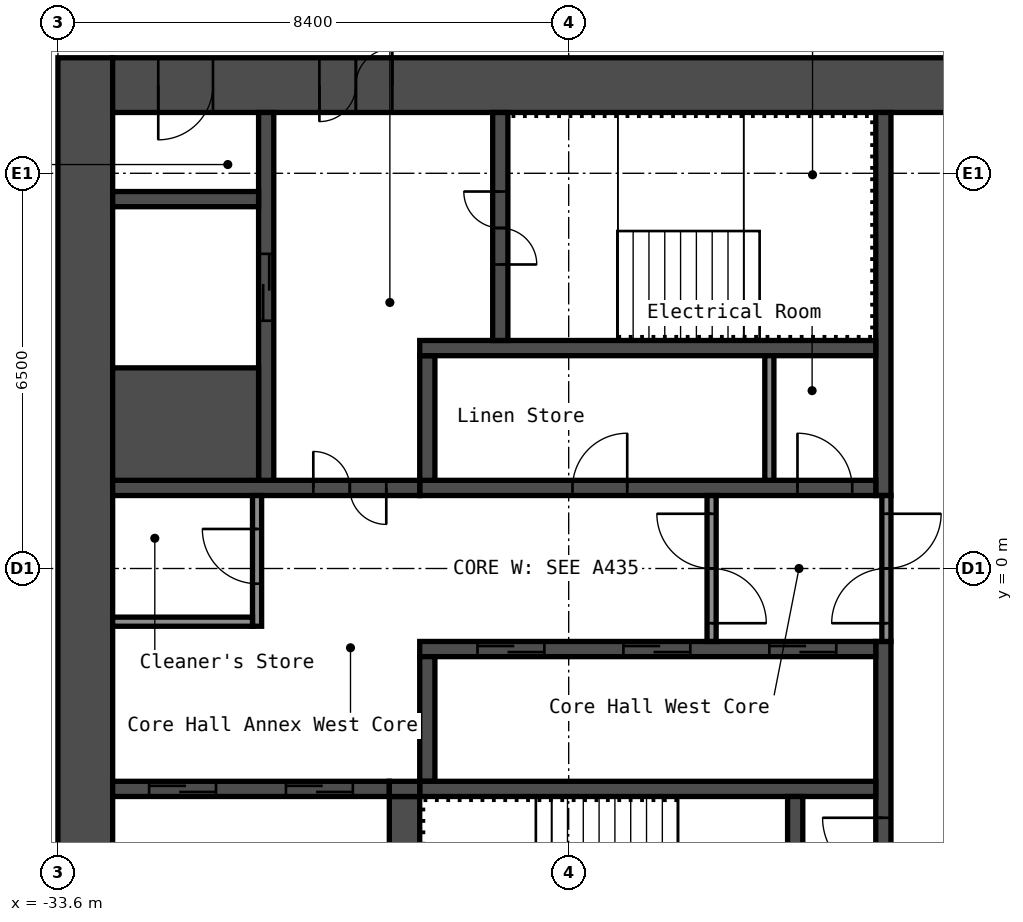
"""IFC4 building model, lengths in metres.
Left out: names, types, materials, properties, quantities, classifications, styles, units other than length and angle.
Written with IfcOpenShell. Run it as: python <this file> out.ifc"""

import sys

from ifc_helpers import new_model, si_unit, direction, frame, frame_2d, origin, place, context, subcontext, project, spatial, rectangle, extrude, element, fill, save


model = new_model("IFC4")
c1 = context("Model", 3, precision=1e-05, world=origin(), true_north=direction((0.0, 1.0)))
c2 = subcontext(c1, "Body", "Model", "MODEL_VIEW")
j1 = project(units=[si_unit("LENGTHUNIT", "METRE"), si_unit("PLANEANGLEUNIT", "RADIAN")], contexts=[c1])
p1 = place(None, origin())
s1 = spatial("IfcSite", under=j1, at=p1, CompositionType="ELEMENT")
p2 = place(p1, origin())
s2 = spatial("IfcBuilding", under=s1, at=p2, CompositionType="ELEMENT")
p3 = place(p2, frame((0.0, 0.0, 245.4)))
s3 = spatial("IfcBuildingStorey", under=s2, at=p3, CompositionType="ELEMENT", Elevation=245.4)
p4 = place(p3, frame((-33.15, -8.4, 0.0), z_axis=(0.0, 0.0, 1.0), x_axis=(0.0, 1.0, 0.0)))
e1 = element("IfcWall", 1, at=p4, inside=s3, PredefinedType="SHEAR", context=c2, shape_type="SweptSolid", body=[
    extrude(rectangle(XDim=16.8, YDim=0.9, at=frame_2d((8.4, 0.0))), origin(), (0.0, 0.0, 1.0), 2.75),
])
p5 = place(p3, frame((-32.7, 7.95, 0.0), z_axis=(0.0, 0.0, 1.0), x_axis=(1.0, 0.0, 0.0)))
e2 = element("IfcWall", 2, at=p5, inside=s3, PredefinedType="SHEAR", context=c2, shape_type="SweptSolid", body=[
    extrude(rectangle(XDim=15.0, YDim=0.9, at=frame_2d((7.5, 0.0))), origin(), (0.0, 0.0, 1.0), 2.75),
])
p6 = place(p5, frame((3.4, 0.0, 0.0)))
e3 = element("IfcOpeningElement", 3, at=p6, cuts=e2, PredefinedType="OPENING", context=c2, shape_type="SweptSolid", body=[
    extrude(rectangle(XDim=1.2, YDim=2.1, at=frame_2d((0.6, 1.05))), frame((0.0, 0.46, 0.0), z_axis=(0.0, -1.0, 0.0), x_axis=(1.0, 0.0, 0.0)), (0.0, 0.0, 1.0), 0.92),
])
p7 = place(p5, frame((0.75, 0.0, 0.0)))
e4 = element("IfcOpeningElement", 4, at=p7, cuts=e2, PredefinedType="OPENING", context=c2, shape_type="SweptSolid", body=[
    extrude(rectangle(XDim=0.9, YDim=2.1, at=frame_2d((0.45, 1.05))), frame((0.0, 0.46, 0.0), z_axis=(0.0, -1.0, 0.0), x_axis=(1.0, 0.0, 0.0)), (0.0, 0.0, 1.0), 0.92),
])
p8 = place(p3, frame((-20.025, 1.2, 0.0), z_axis=(0.0, 0.0, 1.0), x_axis=(0.0, 1.0, 0.0)))
e5 = element("IfcWall", 5, at=p8, inside=s3, PredefinedType="SHEAR", context=c2, shape_type="SweptSolid", body=[
    extrude(rectangle(XDim=6.3, YDim=0.25, at=frame_2d((3.15, 0.0))), origin(), (0.0, 0.0, 1.0), 2.75),
])
p9 = place(p3, frame((-20.025, -7.5, 0.0), z_axis=(0.0, 0.0, 1.0), x_axis=(0.0, 1.0, 0.0)))
e6 = element("IfcWall", 6, at=p9, inside=s3, PredefinedType="SHEAR", context=c2, shape_type="SweptSolid", body=[
    extrude(rectangle(XDim=6.3, YDim=0.25, at=frame_2d((3.15, 0.0))), origin(), (0.0, 0.0, 1.0), 2.75),
])
p10 = place(p9, frame((2.4, 0.0, 0.0)))
e7 = element("IfcOpeningElement", 7, at=p10, cuts=e6, PredefinedType="OPENING", context=c2, shape_type="SweptSolid", body=[
    extrude(rectangle(XDim=1.0, YDim=2.1, at=frame_2d((0.5, 1.05))), frame((0.0, 0.135, 0.0), z_axis=(0.0, -1.0, 0.0), x_axis=(1.0, 0.0, 0.0)), (0.0, 0.0, 1.0), 0.27),
])
p11 = place(p3, frame((-27.65, 1.325, 0.0), z_axis=(0.0, 0.0, 1.0), x_axis=(1.0, 0.0, 0.0)))
e8 = element("IfcWall", 8, at=p11, inside=s3, PredefinedType="SHEAR", context=c2, shape_type="SweptSolid", body=[
    extrude(rectangle(XDim=7.5, YDim=0.25, at=frame_2d((3.75, 0.0))), origin(), (0.0, 0.0, 1.0), 2.75),
])
p12 = place(p11, frame((6.212, 0.0, 0.0)))
e9 = element("IfcOpeningElement", 9, at=p12, cuts=e8, PredefinedType="OPENING", context=c2, shape_type="SweptSolid", body=[
    extrude(rectangle(XDim=0.9, YDim=2.1, at=frame_2d((0.45, 1.05))), frame((0.0, 0.135, 0.0), z_axis=(0.0, -1.0, 0.0), x_axis=(1.0, 0.0, 0.0)), (0.0, 0.0, 1.0), 0.27),
])
p13 = place(p11, frame((2.512, 0.0, 0.0)))
e10 = element("IfcOpeningElement", 10, at=p13, cuts=e8, PredefinedType="OPENING", context=c2, shape_type="SweptSolid", body=[
    extrude(rectangle(XDim=0.9, YDim=2.1, at=frame_2d((0.45, 1.05))), frame((0.0, 0.135, 0.0), z_axis=(0.0, -1.0, 0.0), x_axis=(1.0, 0.0, 0.0)), (0.0, 0.0, 1.0), 0.27),
])
p14 = place(p3, frame((-27.525, 1.45, 0.0), z_axis=(0.0, 0.0, 1.0), x_axis=(0.0, 1.0, 0.0)))
e11 = element("IfcWall", 11, at=p14, inside=s3, PredefinedType="SHEAR", context=c2, shape_type="SweptSolid", body=[
    extrude(rectangle(XDim=2.05, YDim=0.25, at=frame_2d((1.025, 0.0))), origin(), (0.0, 0.0, 1.0), 2.75),
])
p15 = place(p3, frame((-27.65, 3.625, 0.0), z_axis=(0.0, 0.0, 1.0), x_axis=(1.0, 0.0, 0.0)))
e12 = element("IfcWall", 12, at=p15, inside=s3, PredefinedType="SHEAR", context=c2, shape_type="SweptSolid", body=[
    extrude(rectangle(XDim=7.5, YDim=0.25, at=frame_2d((3.75, 0.0))), origin(), (0.0, 0.0, 1.0), 2.75),
])
p16 = place(p3, frame((-26.325, 3.75, 0.0), z_axis=(0.0, 0.0, 1.0), x_axis=(0.0, 1.0, 0.0)))
e13 = element("IfcWall", 13, at=p16, inside=s3, PredefinedType="SHEAR", context=c2, shape_type="SweptSolid", body=[
    extrude(rectangle(XDim=3.75, YDim=0.25, at=frame_2d((1.875, 0.0))), origin(), (0.0, 0.0, 1.0), 2.75),
])
p17 = place(p16, frame((1.25, 0.0, 0.0)))
e14 = element("IfcOpeningElement", 14, at=p17, cuts=e13, PredefinedType="OPENING", context=c2, shape_type="SweptSolid", body=[
    extrude(rectangle(XDim=1.2, YDim=2.1, at=frame_2d((0.6, 1.05))), frame((0.0, 0.135, 0.0), z_axis=(0.0, -1.0, 0.0), x_axis=(1.0, 0.0, 0.0)), (0.0, 0.0, 1.0), 0.27),
])
p18 = place(p3, frame((-32.7, 1.325, 0.0), z_axis=(0.0, 0.0, 1.0), x_axis=(1.0, 0.0, 0.0)))
e15 = element("IfcWall", 15, at=p18, inside=s3, PredefinedType="SHEAR", context=c2, shape_type="SweptSolid", body=[
    extrude(rectangle(XDim=5.05, YDim=0.25, at=frame_2d((2.525, 0.0))), origin(), (0.0, 0.0, 1.0), 2.75),
])
p19 = place(p18, frame((3.3, 0.0, 0.0)))
e16 = element("IfcOpeningElement", 16, at=p19, cuts=e15, PredefinedType="OPENING", context=c2, shape_type="SweptSolid", body=[
    extrude(rectangle(XDim=1.2, YDim=2.1, at=frame_2d((0.6, 1.05))), frame((0.0, 0.135, 0.0), z_axis=(0.0, -1.0, 0.0), x_axis=(1.0, 0.0, 0.0)), (0.0, 0.0, 1.0), 0.27),
])
p20 = place(p3, frame((-30.175, 1.45, 0.0), z_axis=(0.0, 0.0, 1.0), x_axis=(0.0, 1.0, 0.0)))
e17 = element("IfcWall", 17, at=p20, inside=s3, PredefinedType="SHEAR", context=c2, shape_type="SweptSolid", body=[
    extrude(rectangle(XDim=6.05, YDim=0.25, at=frame_2d((3.025, 0.0))), origin(), (0.0, 0.0, 1.0), 2.75),
])
p21 = place(p20, frame((2.625, 0.0, 0.0)))
e18 = element("IfcOpeningElement", 18, at=p21, cuts=e17, PredefinedType="OPENING", context=c2, shape_type="SweptSolid", body=[
    extrude(rectangle(XDim=1.1, YDim=2.1, at=frame_2d((0.55, 1.05))), frame((0.0, 0.135, 0.0), z_axis=(0.0, -1.0, 0.0), x_axis=(1.0, 0.0, 0.0)), (0.0, 0.0, 1.0), 0.27),
])
p22 = place(p3, frame((-32.7, 2.375, 0.0), z_axis=(0.0, 0.0, 1.0), x_axis=(1.0, 0.0, 0.0)))
e19 = element("IfcWall", 19, at=p22, inside=s3, PredefinedType="SHEAR", context=c2, shape_type="SweptSolid", body=[
    extrude(rectangle(XDim=2.4, YDim=1.85, at=frame_2d((1.2, 0.0))), origin(), (0.0, 0.0, 1.0), 2.75),
])
p23 = place(p3, frame((-32.7, 6.075, 0.0), z_axis=(0.0, 0.0, 1.0), x_axis=(1.0, 0.0, 0.0)))
e20 = element("IfcWall", 20, at=p23, inside=s3, PredefinedType="SHEAR", context=c2, shape_type="SweptSolid", body=[
    extrude(rectangle(XDim=2.4, YDim=0.25, at=frame_2d((1.2, 0.0))), origin(), (0.0, 0.0, 1.0), 2.75),
])
p24 = place(p3, frame((-27.65, -1.325, 0.0), z_axis=(0.0, 0.0, 1.0), x_axis=(1.0, 0.0, 0.0)))
e21 = element("IfcWall", 21, at=p24, inside=s3, PredefinedType="SHEAR", context=c2, shape_type="SweptSolid", body=[
    extrude(rectangle(XDim=7.5, YDim=0.25, at=frame_2d((3.75, 0.0))), origin(), (0.0, 0.0, 1.0), 2.75),
])
p25 = place(p24, frame((5.75, 0.0, 0.0)))
e22 = element("IfcOpeningElement", 22, at=p25, cuts=e21, PredefinedType="OPENING", context=c2, shape_type="SweptSolid", body=[
    extrude(rectangle(XDim=1.1, YDim=2.1, at=frame_2d((0.55, 1.05))), frame((0.0, 0.135, 0.0), z_axis=(0.0, -1.0, 0.0), x_axis=(1.0, 0.0, 0.0)), (0.0, 0.0, 1.0), 0.27),
])
p26 = place(p24, frame((3.35, 0.0, 0.0)))
e23 = element("IfcOpeningElement", 23, at=p26, cuts=e21, PredefinedType="OPENING", context=c2, shape_type="SweptSolid", body=[
    extrude(rectangle(XDim=1.1, YDim=2.1, at=frame_2d((0.55, 1.05))), frame((0.0, 0.135, 0.0), z_axis=(0.0, -1.0, 0.0), x_axis=(1.0, 0.0, 0.0)), (0.0, 0.0, 1.0), 0.27),
])
p27 = place(p24, frame((0.95, 0.0, 0.0)))
e24 = element("IfcOpeningElement", 24, at=p27, cuts=e21, PredefinedType="OPENING", context=c2, shape_type="SweptSolid", body=[
    extrude(rectangle(XDim=1.1, YDim=2.1, at=frame_2d((0.55, 1.05))), frame((0.0, 0.135, 0.0), z_axis=(0.0, -1.0, 0.0), x_axis=(1.0, 0.0, 0.0)), (0.0, 0.0, 1.0), 0.27),
])
p28 = place(p3, frame((-27.525, -3.5, 0.0), z_axis=(0.0, 0.0, 1.0), x_axis=(0.0, 1.0, 0.0)))
e25 = element("IfcWall", 25, at=p28, inside=s3, PredefinedType="SHEAR", context=c2, shape_type="SweptSolid", body=[
    extrude(rectangle(XDim=2.05, YDim=0.25, at=frame_2d((1.025, 0.0))), origin(), (0.0, 0.0, 1.0), 2.75),
])
p29 = place(p3, frame((-27.65, -3.625, 0.0), z_axis=(0.0, 0.0, 1.0), x_axis=(1.0, 0.0, 0.0)))
e26 = element("IfcWall", 26, at=p29, inside=s3, PredefinedType="SHEAR", context=c2, shape_type="SweptSolid", body=[
    extrude(rectangle(XDim=7.5, YDim=0.25, at=frame_2d((3.75, 0.0))), origin(), (0.0, 0.0, 1.0), 2.75),
])
p30 = place(p3, frame((-21.475, -7.5, 0.0), z_axis=(0.0, 0.0, 1.0), x_axis=(0.0, 1.0, 0.0)))
e27 = element("IfcWall", 27, at=p30, inside=s3, PredefinedType="SHEAR", context=c2, shape_type="SweptSolid", body=[
    extrude(rectangle(XDim=3.75, YDim=0.25, at=frame_2d((1.875, 0.0))), origin(), (0.0, 0.0, 1.0), 2.75),
])
p31 = place(p30, frame((1.3, 0.0, 0.0)))
e28 = element("IfcOpeningElement", 28, at=p31, cuts=e27, PredefinedType="OPENING", context=c2, shape_type="SweptSolid", body=[
    extrude(rectangle(XDim=1.2, YDim=2.1, at=frame_2d((0.6, 1.05))), frame((0.0, 0.135, 0.0), z_axis=(0.0, -1.0, 0.0), x_axis=(1.0, 0.0, 0.0)), (0.0, 0.0, 1.0), 0.27),
])
p32 = place(p3, frame((-27.9, -7.5, 0.0), z_axis=(0.0, 0.0, 1.0), x_axis=(0.0, 1.0, 0.0)))
e29 = element("IfcWall", 29, at=p32, inside=s3, PredefinedType="SHEAR", context=c2, shape_type="SweptSolid", body=[
    extrude(rectangle(XDim=3.75, YDim=0.5, at=frame_2d((1.875, 0.0))), origin(), (0.0, 0.0, 1.0), 2.75),
])
p33 = place(p3, frame((-32.7, -3.625, 0.0), z_axis=(0.0, 0.0, 1.0), x_axis=(1.0, 0.0, 0.0)))
e30 = element("IfcWall", 30, at=p33, inside=s3, PredefinedType="SHEAR", context=c2, shape_type="SweptSolid", body=[
    extrude(rectangle(XDim=4.55, YDim=0.25, at=frame_2d((2.275, 0.0))), origin(), (0.0, 0.0, 1.0), 2.75),
])
p34 = place(p33, frame((2.85, 0.0, 0.0)))
e31 = element("IfcOpeningElement", 31, at=p34, cuts=e30, PredefinedType="OPENING", context=c2, shape_type="SweptSolid", body=[
    extrude(rectangle(XDim=1.1, YDim=2.1, at=frame_2d((0.55, 1.05))), frame((0.0, 0.135, 0.0), z_axis=(0.0, -1.0, 0.0), x_axis=(1.0, 0.0, 0.0)), (0.0, 0.0, 1.0), 0.27),
])
p35 = place(p33, frame((0.6, 0.0, 0.0)))
e32 = element("IfcOpeningElement", 32, at=p35, cuts=e30, PredefinedType="OPENING", context=c2, shape_type="SweptSolid", body=[
    extrude(rectangle(XDim=1.1, YDim=2.1, at=frame_2d((0.55, 1.05))), frame((0.0, 0.135, 0.0), z_axis=(0.0, -1.0, 0.0), x_axis=(1.0, 0.0, 0.0)), (0.0, 0.0, 1.0), 0.27),
])
p36 = place(p3, frame((-28.15, -3.625, 0.0), z_axis=(0.0, 0.0, 1.0), x_axis=(1.0, 0.0, 0.0)))
e33 = element("IfcWall", 33, at=p36, inside=s3, PredefinedType="SHEAR", context=c2, shape_type="SweptSolid", body=[
    extrude(rectangle(XDim=0.5, YDim=0.25, at=frame_2d((0.25, 0.0))), origin(), (0.0, 0.0, 1.0), 2.75),
])
p37 = place(p3, frame((-19.975, -1.2, 0.0), z_axis=(0.0, 0.0, 1.0), x_axis=(0.0, 1.0, 0.0)))
e34 = element("IfcWall", 34, at=p37, inside=s3, PredefinedType="PARTITIONING", context=c2, shape_type="SweptSolid", body=[
    extrude(rectangle(XDim=2.4, YDim=0.15, at=frame_2d((1.2, 0.0))), origin(), (0.0, 0.0, 1.0), 2.75),
])
p38 = place(p37, frame((0.3, 0.0, 0.0)))
e35 = element("IfcOpeningElement", 35, at=p38, cuts=e34, PredefinedType="OPENING", context=c2, shape_type="SweptSolid", body=[
    extrude(rectangle(XDim=1.8, YDim=2.1, at=frame_2d((0.9, 1.05))), frame((0.0, 0.085, 0.0), z_axis=(0.0, -1.0, 0.0), x_axis=(1.0, 0.0, 0.0)), (0.0, 0.0, 1.0), 0.17),
])
p39 = place(p3, frame((-22.85, -1.2, 0.0), z_axis=(0.0, 0.0, 1.0), x_axis=(0.0, 1.0, 0.0)))
e36 = element("IfcWall", 36, at=p39, inside=s3, PredefinedType="PARTITIONING", context=c2, shape_type="SweptSolid", body=[
    extrude(rectangle(XDim=2.4, YDim=0.15, at=frame_2d((1.2, 0.0))), origin(), (0.0, 0.0, 1.0), 2.75),
])
p40 = place(p39, frame((0.3, 0.0, 0.0)))
e37 = element("IfcOpeningElement", 37, at=p40, cuts=e36, PredefinedType="OPENING", context=c2, shape_type="SweptSolid", body=[
    extrude(rectangle(XDim=1.8, YDim=2.1, at=frame_2d((0.9, 1.05))), frame((0.0, 0.085, 0.0), z_axis=(0.0, -1.0, 0.0), x_axis=(1.0, 0.0, 0.0)), (0.0, 0.0, 1.0), 0.17),
])
p41 = place(p3, frame((-30.325, -0.95, 0.0), z_axis=(0.0, 0.0, 1.0), x_axis=(0.0, 1.0, 0.0)))
e38 = element("IfcWall", 38, at=p41, inside=s3, PredefinedType="PARTITIONING", context=c2, shape_type="SweptSolid", body=[
    extrude(rectangle(XDim=2.15, YDim=0.15, at=frame_2d((1.075, 0.0))), origin(), (0.0, 0.0, 1.0), 2.75),
])
p42 = place(p41, frame((0.7, 0.0, 0.0)))
e39 = element("IfcOpeningElement", 39, at=p42, cuts=e38, PredefinedType="OPENING", context=c2, shape_type="SweptSolid", body=[
    extrude(rectangle(XDim=0.9, YDim=2.1, at=frame_2d((0.45, 1.05))), frame((0.0, 0.085, 0.0), z_axis=(0.0, -1.0, 0.0), x_axis=(1.0, 0.0, 0.0)), (0.0, 0.0, 1.0), 0.17),
])
p43 = place(p3, frame((-32.7, -0.875, 0.0), z_axis=(0.0, 0.0, 1.0), x_axis=(1.0, 0.0, 0.0)))
e40 = element("IfcWall", 40, at=p43, inside=s3, PredefinedType="PARTITIONING", context=c2, shape_type="SweptSolid", body=[
    extrude(rectangle(XDim=2.3, YDim=0.15, at=frame_2d((1.15, 0.0))), origin(), (0.0, 0.0, 1.0), 2.75),
])
p44 = place(p3, frame((-21.9, 1.45, 0.0), z_axis=(0.0, 0.0, 1.0), x_axis=(0.0, 1.0, 0.0)))
e41 = element("IfcWall", 41, at=p44, inside=s3, PredefinedType="PARTITIONING", context=c2, shape_type="SweptSolid", body=[
    extrude(rectangle(XDim=2.05, YDim=0.15, at=frame_2d((1.025, 0.0))), origin(), (0.0, 0.0, 1.0), 2.75),
])
p45 = place(p6, origin())
e42 = element("IfcDoor", 42, at=p45, inside=s3, OperationType="DOUBLE_DOOR_SINGLE_SWING", PredefinedType="DOOR", context=c2, shape_type="SweptSolid", body=[
    extrude(rectangle(XDim=1.2, YDim=2.1, at=frame_2d((0.6, 1.05))), frame((0.0, 0.025, 0.0), z_axis=(0.0, -1.0, 0.0), x_axis=(1.0, 0.0, 0.0)), (0.0, 0.0, 1.0), 0.05),
])
fill(e3, e42)
p46 = place(p7, origin())
e43 = element("IfcDoor", 43, at=p46, inside=s3, OperationType="SINGLE_SWING_LEFT", PredefinedType="DOOR", context=c2, shape_type="SweptSolid", body=[
    extrude(rectangle(XDim=0.9, YDim=2.1, at=frame_2d((0.45, 1.05))), frame((0.0, 0.025, 0.0), z_axis=(0.0, -1.0, 0.0), x_axis=(1.0, 0.0, 0.0)), (0.0, 0.0, 1.0), 0.05),
])
fill(e4, e43)
p47 = place(p17, origin())
e44 = element("IfcDoor", 44, at=p47, inside=s3, OperationType="DOUBLE_DOOR_SINGLE_SWING", PredefinedType="DOOR", context=c2, shape_type="SweptSolid", body=[
    extrude(rectangle(XDim=1.2, YDim=2.1, at=frame_2d((0.6, 1.05))), frame((0.0, 0.025, 0.0), z_axis=(0.0, -1.0, 0.0), x_axis=(1.0, 0.0, 0.0)), (0.0, 0.0, 1.0), 0.05),
])
fill(e14, e44)
p48 = place(p10, origin())
e45 = element("IfcDoor", 45, at=p48, inside=s3, OperationType="SINGLE_SWING_LEFT", PredefinedType="DOOR", context=c2, shape_type="SweptSolid", body=[
    extrude(rectangle(XDim=1.0, YDim=2.1, at=frame_2d((0.5, 1.05))), frame((0.0, 0.025, 0.0), z_axis=(0.0, -1.0, 0.0), x_axis=(1.0, 0.0, 0.0)), (0.0, 0.0, 1.0), 0.05),
])
fill(e7, e45)
p49 = place(p19, origin())
e46 = element("IfcDoor", 46, at=p49, inside=s3, OperationType="DOUBLE_DOOR_SINGLE_SWING", PredefinedType="DOOR", context=c2, shape_type="SweptSolid", body=[
    extrude(rectangle(XDim=1.2, YDim=2.1, at=frame_2d((0.6, 1.05))), frame((0.0, 0.025, 0.0), z_axis=(0.0, -1.0, 0.0), x_axis=(1.0, 0.0, 0.0)), (0.0, 0.0, 1.0), 0.05),
])
fill(e16, e46)
p50 = place(p38, origin())
e47 = element("IfcDoor", 47, at=p50, inside=s3, OperationType="DOUBLE_DOOR_SINGLE_SWING", PredefinedType="DOOR", context=c2, shape_type="SweptSolid", body=[
    extrude(rectangle(XDim=1.8, YDim=2.1, at=frame_2d((0.9, 1.05))), frame((0.0, 0.025, 0.0), z_axis=(0.0, -1.0, 0.0), x_axis=(1.0, 0.0, 0.0)), (0.0, 0.0, 1.0), 0.05),
])
fill(e35, e47)
p51 = place(p40, origin())
e48 = element("IfcDoor", 48, at=p51, inside=s3, OperationType="DOUBLE_DOOR_SINGLE_SWING", PredefinedType="DOOR", context=c2, shape_type="SweptSolid", body=[
    extrude(rectangle(XDim=1.8, YDim=2.1, at=frame_2d((0.9, 1.05))), frame((0.0, 0.025, 0.0), z_axis=(0.0, -1.0, 0.0), x_axis=(1.0, 0.0, 0.0)), (0.0, 0.0, 1.0), 0.05),
])
fill(e37, e48)
p52 = place(p42, origin())
e49 = element("IfcDoor", 49, at=p52, inside=s3, OperationType="SINGLE_SWING_LEFT", PredefinedType="DOOR", context=c2, shape_type="SweptSolid", body=[
    extrude(rectangle(XDim=0.9, YDim=2.1, at=frame_2d((0.45, 1.05))), frame((0.0, 0.025, 0.0), z_axis=(0.0, -1.0, 0.0), x_axis=(1.0, 0.0, 0.0)), (0.0, 0.0, 1.0), 0.05),
])
fill(e39, e49)
p53 = place(p12, origin())
e50 = element("IfcDoor", 50, at=p53, inside=s3, OperationType="SINGLE_SWING_RIGHT", PredefinedType="DOOR", context=c2, shape_type="SweptSolid", body=[
    extrude(rectangle(XDim=0.9, YDim=2.1, at=frame_2d((0.45, 1.05))), frame((0.0, 0.025, 0.0), z_axis=(0.0, -1.0, 0.0), x_axis=(1.0, 0.0, 0.0)), (0.0, 0.0, 1.0), 0.05),
])
fill(e9, e50)
p54 = place(p13, origin())
e51 = element("IfcDoor", 51, at=p54, inside=s3, OperationType="SINGLE_SWING_LEFT", PredefinedType="DOOR", context=c2, shape_type="SweptSolid", body=[
    extrude(rectangle(XDim=0.9, YDim=2.1, at=frame_2d((0.45, 1.05))), frame((0.0, 0.025, 0.0), z_axis=(0.0, -1.0, 0.0), x_axis=(1.0, 0.0, 0.0)), (0.0, 0.0, 1.0), 0.05),
])
fill(e10, e51)
p55 = place(p25, origin())
e52 = element("IfcDoor", 52, at=p55, inside=s3, OperationType="DOUBLE_DOOR_SLIDING", PredefinedType="DOOR", context=c2, shape_type="SweptSolid", body=[
    extrude(rectangle(XDim=1.1, YDim=2.1, at=frame_2d((0.55, 1.05))), frame((0.0, 0.025, 0.0), z_axis=(0.0, -1.0, 0.0), x_axis=(1.0, 0.0, 0.0)), (0.0, 0.0, 1.0), 0.05),
])
fill(e22, e52)
p56 = place(p26, origin())
e53 = element("IfcDoor", 53, at=p56, inside=s3, OperationType="DOUBLE_DOOR_SLIDING", PredefinedType="DOOR", context=c2, shape_type="SweptSolid", body=[
    extrude(rectangle(XDim=1.1, YDim=2.1, at=frame_2d((0.55, 1.05))), frame((0.0, 0.025, 0.0), z_axis=(0.0, -1.0, 0.0), x_axis=(1.0, 0.0, 0.0)), (0.0, 0.0, 1.0), 0.05),
])
fill(e23, e53)
p57 = place(p27, origin())
e54 = element("IfcDoor", 54, at=p57, inside=s3, OperationType="DOUBLE_DOOR_SLIDING", PredefinedType="DOOR", context=c2, shape_type="SweptSolid", body=[
    extrude(rectangle(XDim=1.1, YDim=2.1, at=frame_2d((0.55, 1.05))), frame((0.0, 0.025, 0.0), z_axis=(0.0, -1.0, 0.0), x_axis=(1.0, 0.0, 0.0)), (0.0, 0.0, 1.0), 0.05),
])
fill(e24, e54)
p58 = place(p21, origin())
e55 = element("IfcDoor", 55, at=p58, inside=s3, OperationType="DOUBLE_DOOR_SLIDING", PredefinedType="DOOR", context=c2, shape_type="SweptSolid", body=[
    extrude(rectangle(XDim=1.1, YDim=2.1, at=frame_2d((0.55, 1.05))), frame((0.0, 0.025, 0.0), z_axis=(0.0, -1.0, 0.0), x_axis=(1.0, 0.0, 0.0)), (0.0, 0.0, 1.0), 0.05),
])
fill(e18, e55)
p59 = place(p34, origin())
e56 = element("IfcDoor", 56, at=p59, inside=s3, OperationType="DOUBLE_DOOR_SLIDING", PredefinedType="DOOR", context=c2, shape_type="SweptSolid", body=[
    extrude(rectangle(XDim=1.1, YDim=2.1, at=frame_2d((0.55, 1.05))), frame((0.0, 0.025, 0.0), z_axis=(0.0, -1.0, 0.0), x_axis=(1.0, 0.0, 0.0)), (0.0, 0.0, 1.0), 0.05),
])
fill(e31, e56)
p60 = place(p35, origin())
e57 = element("IfcDoor", 57, at=p60, inside=s3, OperationType="DOUBLE_DOOR_SLIDING", PredefinedType="DOOR", context=c2, shape_type="SweptSolid", body=[
    extrude(rectangle(XDim=1.1, YDim=2.1, at=frame_2d((0.55, 1.05))), frame((0.0, 0.025, 0.0), z_axis=(0.0, -1.0, 0.0), x_axis=(1.0, 0.0, 0.0)), (0.0, 0.0, 1.0), 0.05),
])
fill(e32, e57)
save(model, sys.argv[1])
